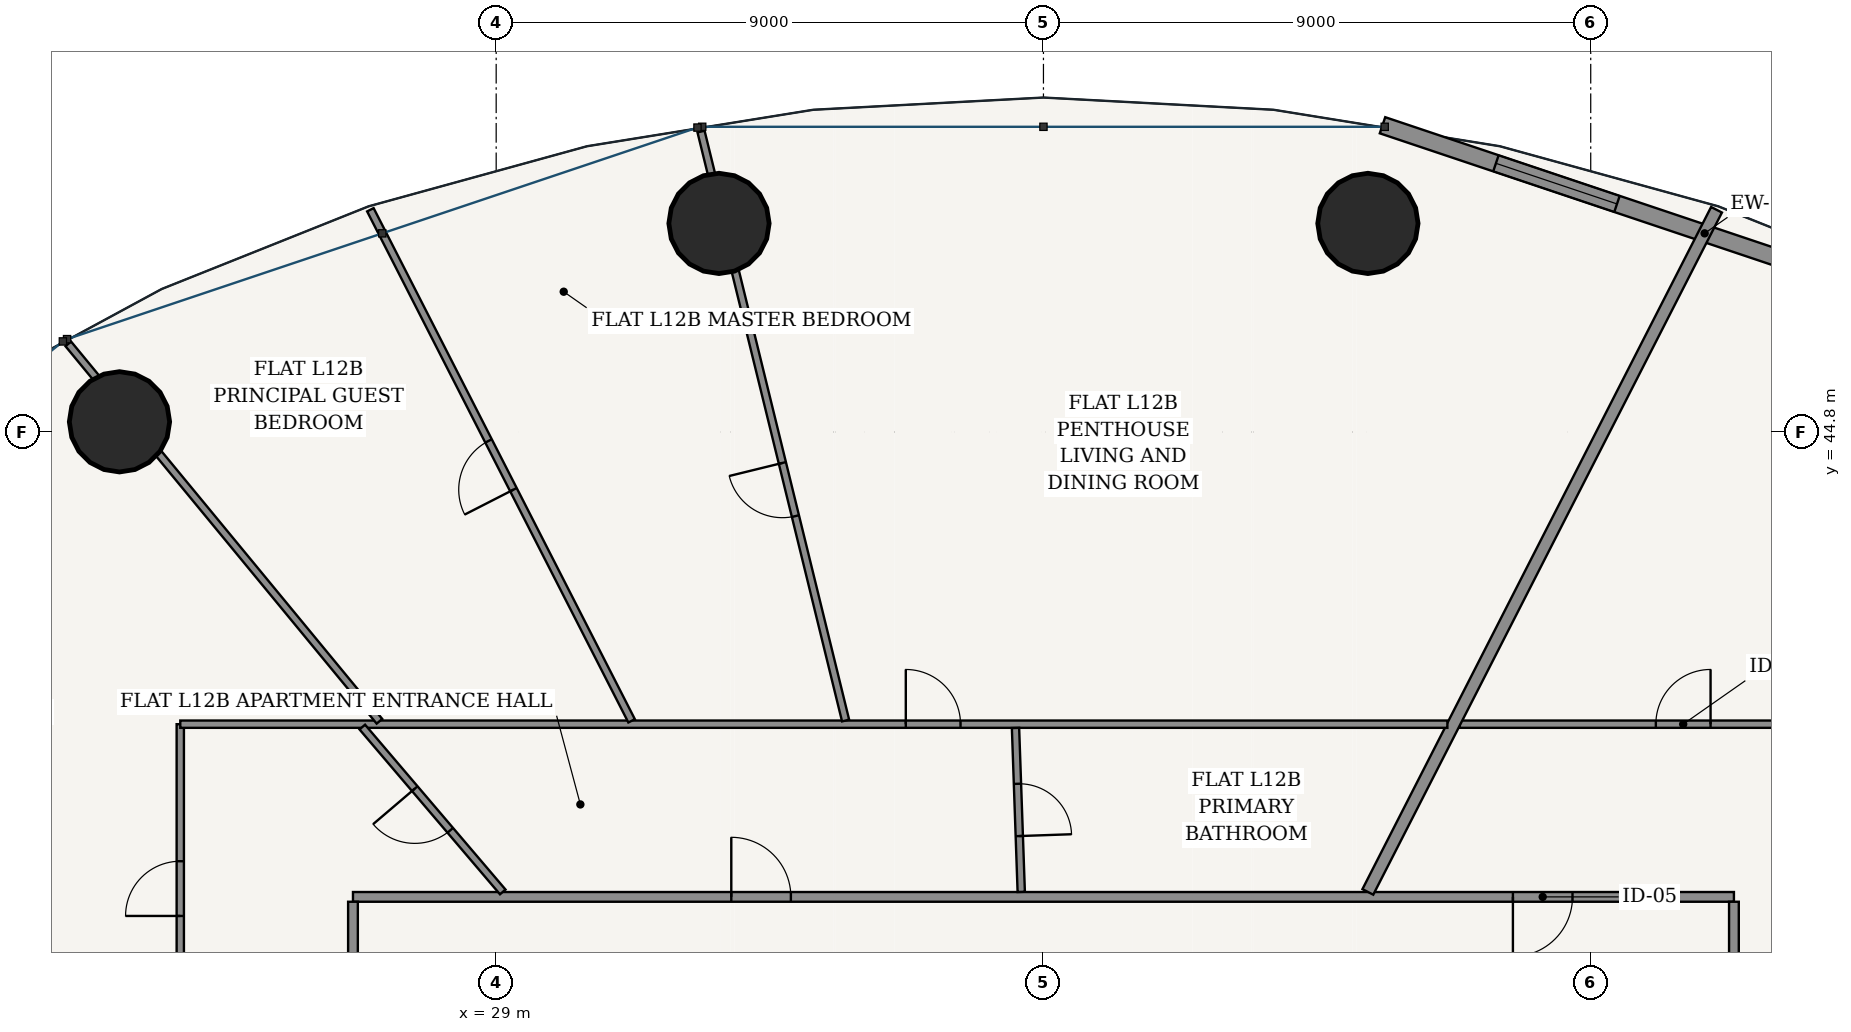
"""IFC4 building model, lengths in metres.
Left out: names, types, materials, properties, quantities, classifications, styles, units other than length and angle.
Written with IfcOpenShell. Run it as: python <this file> out.ifc"""

import sys

from ifc_helpers import new_model, si_unit, direction, frame, frame_2d, origin, origin_2d, place, context, subcontext, project, spatial, rectangle, hollow_circle, extrude, source, transform, mapped, element, fill, save


model = new_model("IFC4")
c1 = context("Model", 3, precision=1e-05, world=origin(), true_north=direction((-0.2419218956, 0.970295726276)))
c2 = subcontext(c1, "Body", "Model", "MODEL_VIEW")
j1 = project(units=[si_unit("LENGTHUNIT", "METRE"), si_unit("PLANEANGLEUNIT", "RADIAN")], contexts=[c1])
p1 = place(None, origin())
s1 = spatial("IfcSite", under=j1, at=p1, CompositionType="ELEMENT")
p2 = place(p1, origin())
s2 = spatial("IfcBuilding", under=s1, at=p2, CompositionType="ELEMENT")
p3 = place(p2, frame((0.0, 0.0, 49.2)))
s3 = spatial("IfcBuildingStorey", under=s2, at=p3, CompositionType="ELEMENT", Elevation=49.2)
for number, where, z_axis, x_axis in (
    (1, (43.336, 48.23, 0.0), (0.0, 0.0, 1.0), (1.0, 0.0, 0.0)),
    (2, (32.664, 48.23, 0.0), (0.0, 0.0, 1.0), (1.0, 0.0, 0.0)),
    (3, (22.805, 44.968, 0.0), (0.0, 0.0, 1.0), (1.0, 0.0, 0.0)),
):
    element("IfcColumn", number, at=place(p3, frame(where, z_axis=z_axis, x_axis=x_axis)), inside=s3, PredefinedType="COLUMN", context=c2, shape_type="SweptSolid", body=[
        extrude(hollow_circle(Radius=0.825, WallThickness=0.05, at=origin_2d()), origin(), (0.0, 0.0, 1.0), 3.6),
    ])
p4 = place(p3, frame((54.171, 46.289, 0.0), z_axis=(0.0, 0.0, 1.0), x_axis=(-0.948041258496, 0.318147406385, 0.0)))
e4 = element("IfcWall", 4, at=p4, inside=s3, PredefinedType="SOLIDWALL", context=c2, shape_type="SweptSolid", body=[
    extrude(rectangle(XDim=11.175, YDim=0.28, at=frame_2d((5.588, 0.0))), origin(), (0.0, 0.0, 1.0), 3.32),
])
p5 = place(p4, frame((1.967, 0.0, 0.85)))
e5 = element("IfcOpeningElement", 5, at=p5, cuts=e4, PredefinedType="OPENING", context=c2, shape_type="SweptSolid", body=[
    extrude(rectangle(XDim=2.1, YDim=1.95, at=frame_2d((1.05, 0.975))), frame((0.0, 0.15, 0.0), z_axis=(0.0, -1.0, 0.0), x_axis=(1.0, 0.0, 0.0)), (0.0, 0.0, 1.0), 0.3),
])
p6 = place(p4, frame((7.108, 0.0, 0.85)))
e6 = element("IfcOpeningElement", 6, at=p6, cuts=e4, PredefinedType="OPENING", context=c2, shape_type="SweptSolid", body=[
    extrude(rectangle(XDim=2.1, YDim=1.95, at=frame_2d((1.05, 0.975))), frame((0.0, 0.15, 0.0), z_axis=(0.0, -1.0, 0.0), x_axis=(1.0, 0.0, 0.0)), (0.0, 0.0, 1.0), 0.3),
])
p7 = place(p3, frame((26.645, 37.155, 0.0), z_axis=(0.0, 0.0, 1.0), x_axis=(1.0, 0.0, 0.0)))
e7 = element("IfcWall", 7, at=p7, inside=s3, PredefinedType="PARTITIONING", context=c2, shape_type="SweptSolid", body=[
    extrude(rectangle(XDim=22.71, YDim=0.16, at=frame_2d((11.355, 0.0))), origin(), (0.0, 0.0, 1.0), 2.688),
])
p8 = place(p7, frame((19.075, 0.0, 0.0)))
e8 = element("IfcOpeningElement", 8, at=p8, cuts=e7, PredefinedType="OPENING", context=c2, shape_type="SweptSolid", body=[
    extrude(rectangle(XDim=0.98, YDim=2.2, at=frame_2d((0.49, 1.1))), frame((0.0, 0.09, 0.0), z_axis=(0.0, -1.0, 0.0), x_axis=(1.0, 0.0, 0.0)), (0.0, 0.0, 1.0), 0.18),
])
p9 = place(p7, frame((6.221, 0.0, 0.0)))
e9 = element("IfcOpeningElement", 9, at=p9, cuts=e7, PredefinedType="OPENING", context=c2, shape_type="SweptSolid", body=[
    extrude(rectangle(XDim=0.98, YDim=2.2, at=frame_2d((0.49, 1.1))), frame((0.0, 0.09, 0.0), z_axis=(0.0, -1.0, 0.0), x_axis=(1.0, 0.0, 0.0)), (0.0, 0.0, 1.0), 0.18),
])
p10 = place(p3, frame((26.645, 16.525, 0.0), z_axis=(0.0, 0.0, 1.0), x_axis=(0.0, 1.0, 0.0)))
e10 = element("IfcWall", 10, at=p10, inside=s3, PredefinedType="PARTITIONING", context=c2, shape_type="SweptSolid", body=[
    extrude(rectangle(XDim=20.55, YDim=0.16, at=frame_2d((10.275, 0.0))), origin(), (0.0, 0.0, 1.0), 2.688),
])
p11 = place(p10, frame((2.224, 0.0, 0.0)))
e11 = element("IfcOpeningElement", 11, at=p11, cuts=e10, PredefinedType="OPENING", context=c2, shape_type="SweptSolid", body=[
    extrude(rectangle(XDim=0.98, YDim=2.2, at=frame_2d((0.49, 1.1))), frame((0.0, 0.09, 0.0), z_axis=(0.0, -1.0, 0.0), x_axis=(1.0, 0.0, 0.0)), (0.0, 0.0, 1.0), 0.18),
])
p12 = place(p3, frame((49.355, 16.525, 0.0), z_axis=(0.0, 0.0, 1.0), x_axis=(0.0, 1.0, 0.0)))
e12 = element("IfcWall", 12, at=p12, inside=s3, PredefinedType="PARTITIONING", context=c2, shape_type="SweptSolid", body=[
    extrude(rectangle(XDim=20.55, YDim=0.16, at=frame_2d((10.275, 0.0))), origin(), (0.0, 0.0, 1.0), 2.688),
])
p13 = place(p3, frame((44.847, 39.995, 0.0), z_axis=(0.0, 0.0, 1.0), x_axis=(1.0, 0.0, 0.0)))
e13 = element("IfcWall", 13, at=p13, inside=s3, PredefinedType="PARTITIONING", context=c2, shape_type="SweptSolid", body=[
    extrude(rectangle(XDim=7.348, YDim=0.12, at=frame_2d((3.674, 0.0))), origin(), (0.0, 0.0, 1.0), 2.688),
])
p14 = place(p13, frame((3.224, 0.0, 0.0)))
e14 = element("IfcOpeningElement", 14, at=p14, cuts=e13, PredefinedType="OPENING", context=c2, shape_type="SweptSolid", body=[
    extrude(rectangle(XDim=0.9, YDim=2.15, at=frame_2d((0.45, 1.075))), frame((0.0, 0.07, 0.0), z_axis=(0.0, -1.0, 0.0), x_axis=(1.0, 0.0, 0.0)), (0.0, 0.0, 1.0), 0.14),
])
p15 = place(p3, frame((43.335, 37.237, 0.0), z_axis=(0.0, 0.0, 1.0), x_axis=(0.455148959499, 0.890415310216, 0.0)))
e15 = element("IfcWall", 15, at=p15, inside=s3, PredefinedType="PARTITIONING", context=c2, shape_type="SweptSolid", body=[
    extrude(rectangle(XDim=12.598, YDim=0.2, at=frame_2d((6.299, 0.0))), origin(), (0.0, 0.0, 1.0), 2.762),
])
p16 = place(p3, frame((23.805, 34.588, 0.0), z_axis=(0.0, 0.0, 1.0), x_axis=(0.0, 1.0, 0.0)))
e16 = element("IfcWall", 16, at=p16, inside=s3, PredefinedType="PARTITIONING", context=c2, shape_type="SweptSolid", body=[
    extrude(rectangle(XDim=5.407, YDim=0.12, at=frame_2d((2.704, 0.0))), origin(), (0.0, 0.0, 1.0), 2.999),
])
p17 = place(p16, frame((2.253, 0.0, 0.0)))
e17 = element("IfcOpeningElement", 17, at=p17, cuts=e16, PredefinedType="OPENING", context=c2, shape_type="SweptSolid", body=[
    extrude(rectangle(XDim=0.9, YDim=2.15, at=frame_2d((0.45, 1.075))), frame((0.0, 0.07, 0.0), z_axis=(0.0, -1.0, 0.0), x_axis=(1.0, 0.0, 0.0)), (0.0, 0.0, 1.0), 0.14),
])
p18 = place(p3, frame((23.805, 39.995, 0.0), z_axis=(0.0, 0.0, 1.0), x_axis=(1.0, 0.0, 0.0)))
e18 = element("IfcWall", 18, at=p18, inside=s3, PredefinedType="PARTITIONING", context=c2, shape_type="SweptSolid", body=[
    extrude(rectangle(XDim=20.838, YDim=0.12, at=frame_2d((10.419, 0.0))), origin(), (0.0, 0.0, 1.0), 2.688),
])
p19 = place(p18, frame((11.931, 0.0, 0.0)))
e19 = element("IfcOpeningElement", 19, at=p19, cuts=e18, PredefinedType="OPENING", context=c2, shape_type="SweptSolid", body=[
    extrude(rectangle(XDim=0.9, YDim=2.15, at=frame_2d((0.45, 1.075))), frame((0.0, 0.07, 0.0), z_axis=(0.0, -1.0, 0.0), x_axis=(1.0, 0.0, 0.0)), (0.0, 0.0, 1.0), 0.14),
])
p20 = place(p3, frame((34.746, 40.055, 0.0), z_axis=(0.0, 0.0, 1.0), x_axis=(-0.238386209483, 0.971170435675, 0.0)))
e20 = element("IfcWall", 20, at=p20, inside=s3, PredefinedType="PARTITIONING", context=c2, shape_type="SweptSolid", body=[
    extrude(rectangle(XDim=9.973, YDim=0.12, at=frame_2d((4.987, 0.0))), origin(), (0.0, 0.0, 1.0), 2.688),
])
p21 = place(p20, frame((3.461, 0.0, 0.0)))
e21 = element("IfcOpeningElement", 21, at=p21, cuts=e20, PredefinedType="OPENING", context=c2, shape_type="SweptSolid", body=[
    extrude(rectangle(XDim=0.9, YDim=2.15, at=frame_2d((0.45, 1.075))), frame((0.0, 0.07, 0.0), z_axis=(0.0, -1.0, 0.0), x_axis=(1.0, 0.0, 0.0)), (0.0, 0.0, 1.0), 0.14),
])
p22 = place(p3, frame((31.227, 40.05, 0.0), z_axis=(0.0, 0.0, 1.0), x_axis=(-0.455142050367, 0.890418841887, 0.0)))
e22 = element("IfcWall", 22, at=p22, inside=s3, PredefinedType="PARTITIONING", context=c2, shape_type="SweptSolid", body=[
    extrude(rectangle(XDim=9.438, YDim=0.12, at=frame_2d((4.719, 0.0))), origin(), (0.0, 0.0, 1.0), 2.762),
])
p23 = place(p22, frame((4.269, 0.0, 0.0)))
e23 = element("IfcOpeningElement", 23, at=p23, cuts=e22, PredefinedType="OPENING", context=c2, shape_type="SweptSolid", body=[
    extrude(rectangle(XDim=0.9, YDim=2.15, at=frame_2d((0.45, 1.075))), frame((0.0, 0.07, 0.0), z_axis=(0.0, -1.0, 0.0), x_axis=(1.0, 0.0, 0.0)), (0.0, 0.0, 1.0), 0.14),
])
p24 = place(p3, frame((27.081, 40.043, 0.0), z_axis=(0.0, 0.0, 1.0), x_axis=(-0.636193310573, 0.771529695852, 0.0)))
e24 = element("IfcWall", 24, at=p24, inside=s3, PredefinedType="PARTITIONING", context=c2, shape_type="SweptSolid", body=[
    extrude(rectangle(XDim=8.044, YDim=0.12, at=frame_2d((4.022, 0.0))), origin(), (0.0, 0.0, 1.0), 2.688),
])
p25 = place(p3, frame((37.635, 37.237, 0.0), z_axis=(0.0, 0.0, 1.0), x_axis=(-0.03493293564, 0.999389658746, 0.0)))
e25 = element("IfcWall", 25, at=p25, inside=s3, PredefinedType="PARTITIONING", context=c2, shape_type="SweptSolid", body=[
    extrude(rectangle(XDim=2.698, YDim=0.12, at=frame_2d((1.349, 0.0))), origin(), (0.0, 0.0, 1.0), 3.32),
])
p26 = place(p25, frame((0.919, 0.0, 0.0)))
e26 = element("IfcOpeningElement", 26, at=p26, cuts=e25, PredefinedType="OPENING", context=c2, shape_type="SweptSolid", body=[
    extrude(rectangle(XDim=0.86, YDim=2.15, at=frame_2d((0.43, 1.075))), frame((0.0, 0.07, 0.0), z_axis=(0.0, -1.0, 0.0), x_axis=(1.0, 0.0, 0.0)), (0.0, 0.0, 1.0), 0.14),
])
p27 = place(p3, frame((29.108, 37.237, 0.0), z_axis=(0.0, 0.0, 1.0), x_axis=(-0.648553247009, 0.761169288526, 0.0)))
e27 = element("IfcWall", 27, at=p27, inside=s3, PredefinedType="PARTITIONING", context=c2, shape_type="SweptSolid", body=[
    extrude(rectangle(XDim=3.562, YDim=0.12, at=frame_2d((1.781, 0.0))), origin(), (0.0, 0.0, 1.0), 2.999),
])
p28 = place(p27, frame((1.331, 0.0, 0.0)))
e28 = element("IfcOpeningElement", 28, at=p28, cuts=e27, PredefinedType="OPENING", context=c2, shape_type="SweptSolid", body=[
    extrude(rectangle(XDim=0.9, YDim=2.15, at=frame_2d((0.45, 1.075))), frame((0.0, 0.07, 0.0), z_axis=(0.0, -1.0, 0.0), x_axis=(1.0, 0.0, 0.0)), (0.0, 0.0, 1.0), 0.14),
])
p29 = place(p3, frame((26.565, 32.991, 0.0), z_axis=(0.0, 0.0, 1.0), x_axis=(-0.879369737803, 0.476139542819, 0.0)))
e29 = element("IfcWall", 29, at=p29, inside=s3, PredefinedType="PARTITIONING", context=c2, shape_type="SweptSolid", body=[
    extrude(rectangle(XDim=14.295, YDim=0.2, at=frame_2d((7.147, 0.0))), origin(), (0.0, 0.0, 1.0), 2.688),
])
m1 = source(origin(), c2, "Body", "SweptSolid", [
    extrude(rectangle(XDim=2.1, YDim=1.95, at=frame_2d((1.05, 0.975))), frame((0.0, 0.03, 0.0), z_axis=(0.0, -1.0, 0.0), x_axis=(1.0, 0.0, 0.0)), (0.0, 0.0, 1.0), 0.06),
])
p30 = place(p6, origin())
e30 = element("IfcWindow", 30, at=p30, inside=s3, PartitioningType="SINGLE_PANEL", PredefinedType="WINDOW", context=c2, shape_type="MappedRepresentation", body=[
    mapped(m1, transform((0.0, 0.0, 0.0), scale=1.0)),
])
fill(e6, e30)
m2 = source(origin(), c2, "Body", "SweptSolid", [
    extrude(rectangle(XDim=0.98, YDim=2.2, at=frame_2d((0.49, 1.1))), frame((0.0, 0.025, 0.0), z_axis=(0.0, -1.0, 0.0), x_axis=(1.0, 0.0, 0.0)), (0.0, 0.0, 1.0), 0.05),
])
p31 = place(p8, frame((0.98, 0.0, 0.0), z_axis=(0.0, 0.0, 1.0), x_axis=(-1.0, 0.0, 0.0)))
e31 = element("IfcDoor", 31, at=p31, inside=s3, OperationType="SINGLE_SWING_RIGHT", PredefinedType="DOOR", context=c2, shape_type="MappedRepresentation", body=[
    mapped(m2, transform((0.0, 0.0, 0.0), scale=1.0)),
])
fill(e8, e31)
m3 = source(origin(), c2, "Body", "SweptSolid", [
    extrude(rectangle(XDim=0.9, YDim=2.15, at=frame_2d((0.45, 1.075))), frame((0.0, 0.025, 0.0), z_axis=(0.0, -1.0, 0.0), x_axis=(1.0, 0.0, 0.0)), (0.0, 0.0, 1.0), 0.05),
])
p32 = place(p14, origin())
e32 = element("IfcDoor", 32, at=p32, inside=s3, OperationType="SINGLE_SWING_RIGHT", PredefinedType="DOOR", context=c2, shape_type="MappedRepresentation", body=[
    mapped(m3, transform((0.0, 0.0, 0.0), scale=1.0)),
])
fill(e14, e32)
p33 = place(p9, origin())
e33 = element("IfcDoor", 33, at=p33, inside=s3, OperationType="SINGLE_SWING_LEFT", PredefinedType="DOOR", context=c2, shape_type="MappedRepresentation", body=[
    mapped(m2, transform((0.0, 0.0, 0.0), scale=1.0)),
])
fill(e9, e33)
m4 = source(origin(), c2, "Body", "SweptSolid", [
    extrude(rectangle(XDim=0.86, YDim=2.15, at=frame_2d((0.43, 1.075))), frame((0.0, 0.025, 0.0), z_axis=(0.0, -1.0, 0.0), x_axis=(1.0, 0.0, 0.0)), (0.0, 0.0, 1.0), 0.05),
])
p34 = place(p26, frame((0.86, 0.0, 0.0), z_axis=(0.0, 0.0, 1.0), x_axis=(-1.0, 0.0, 0.0)))
e34 = element("IfcDoor", 34, at=p34, inside=s3, OperationType="SINGLE_SWING_RIGHT", PredefinedType="DOOR", context=c2, shape_type="MappedRepresentation", body=[
    mapped(m4, transform((0.0, 0.0, 0.0), scale=1.0)),
])
fill(e26, e34)
p35 = place(p19, origin())
e35 = element("IfcDoor", 35, at=p35, inside=s3, OperationType="SINGLE_SWING_LEFT", PredefinedType="DOOR", context=c2, shape_type="MappedRepresentation", body=[
    mapped(m3, transform((0.0, 0.0, 0.0), scale=1.0)),
])
fill(e19, e35)
p36 = place(p28, origin())
e36 = element("IfcDoor", 36, at=p36, inside=s3, OperationType="SINGLE_SWING_RIGHT", PredefinedType="DOOR", context=c2, shape_type="MappedRepresentation", body=[
    mapped(m3, transform((0.0, 0.0, 0.0), scale=1.0)),
])
fill(e28, e36)
p37 = place(p17, origin())
e37 = element("IfcDoor", 37, at=p37, inside=s3, OperationType="SINGLE_SWING_LEFT", PredefinedType="DOOR", context=c2, shape_type="MappedRepresentation", body=[
    mapped(m3, transform((0.0, 0.0, 0.0), scale=1.0)),
])
fill(e17, e37)
p38 = place(p21, origin())
e38 = element("IfcDoor", 38, at=p38, inside=s3, OperationType="SINGLE_SWING_RIGHT", PredefinedType="DOOR", context=c2, shape_type="MappedRepresentation", body=[
    mapped(m3, transform((0.0, 0.0, 0.0), scale=1.0)),
])
fill(e21, e38)
p39 = place(p23, origin())
e39 = element("IfcDoor", 39, at=p39, inside=s3, OperationType="SINGLE_SWING_LEFT", PredefinedType="DOOR", context=c2, shape_type="MappedRepresentation", body=[
    mapped(m3, transform((0.0, 0.0, 0.0), scale=1.0)),
])
fill(e23, e39)
save(model, sys.argv[1])
